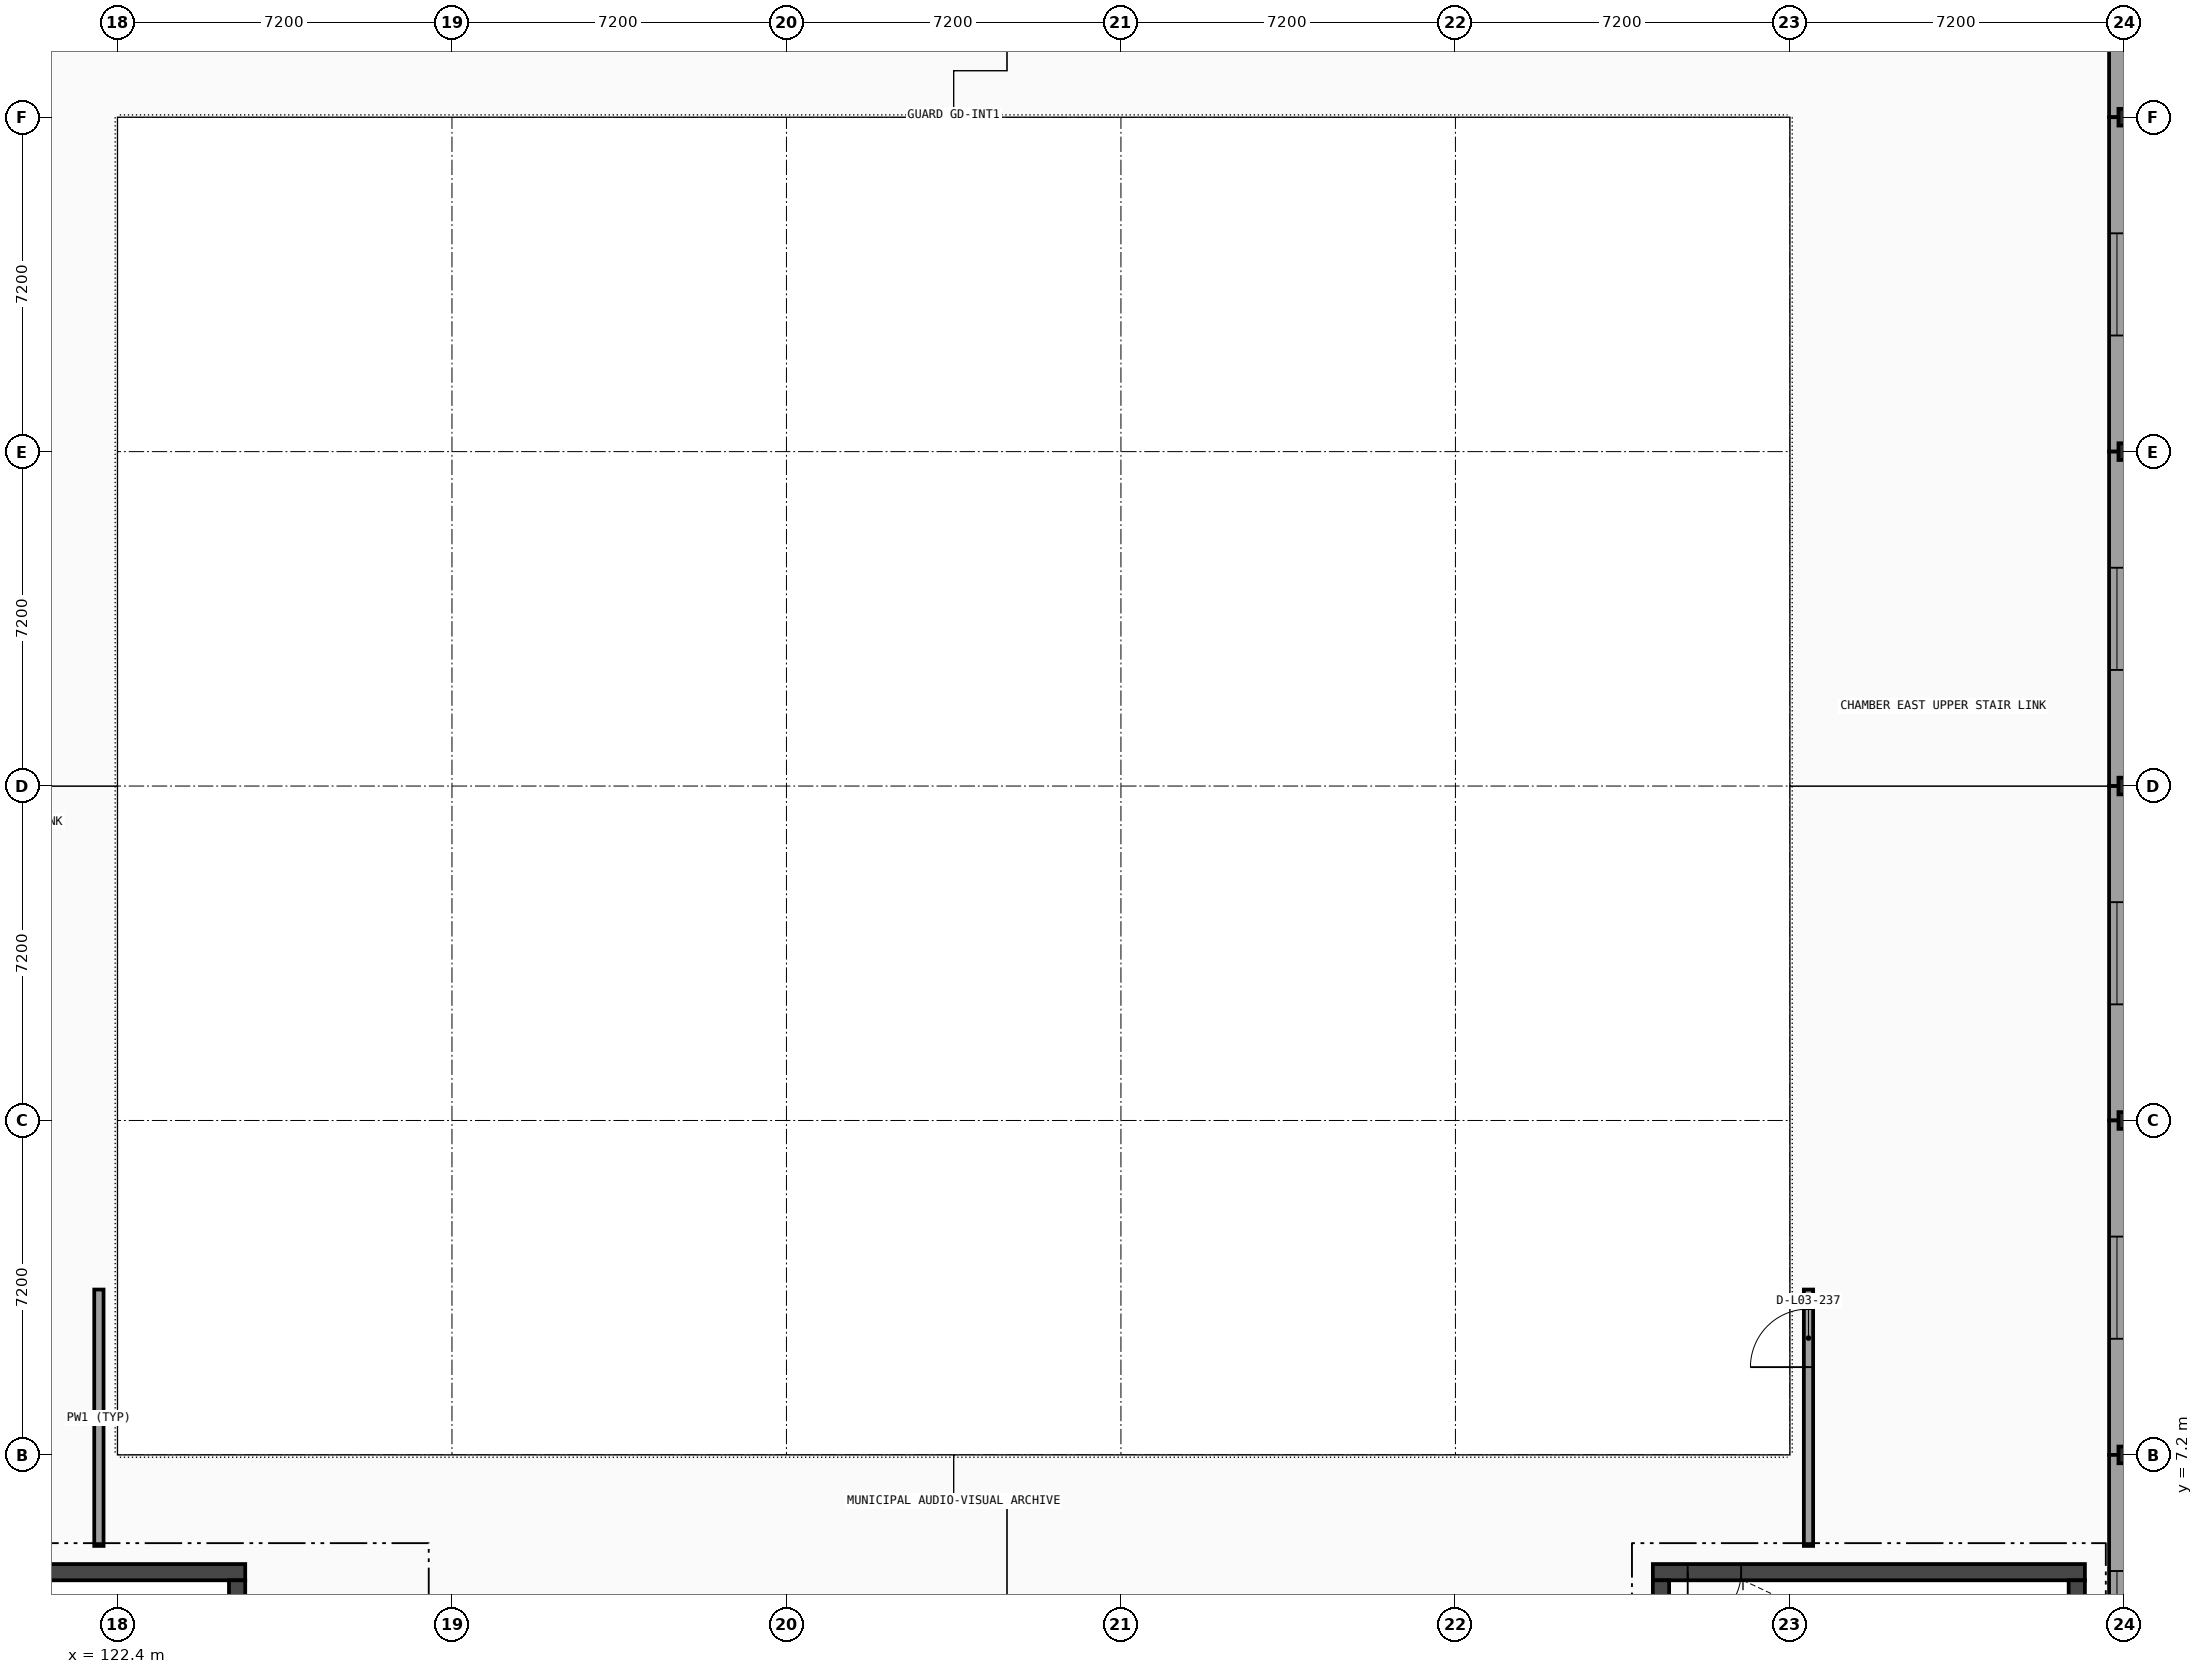
"""IFC4 building model, lengths in metres.
Left out: names, types, materials, properties, quantities, classifications, styles, units other than length and angle.
Written with IfcOpenShell. Run it as: python <this file> out.ifc"""

import sys

from ifc_helpers import new_model, si_unit, direction, frame, frame_2d, origin, origin_2d, place, context, subcontext, project, spatial, rectangle, i_section, extrude, element, fill, save


model = new_model("IFC4")
c1 = context("Model", 3, precision=1e-05, world=origin(), true_north=direction((0.0, 1.0)))
c2 = subcontext(c1, "Body", "Model", "MODEL_VIEW")
j1 = project(units=[si_unit("LENGTHUNIT", "METRE"), si_unit("PLANEANGLEUNIT", "RADIAN")], contexts=[c1])
p1 = place(None, origin())
s1 = spatial("IfcSite", under=j1, at=p1, CompositionType="ELEMENT")
p2 = place(p1, origin())
s2 = spatial("IfcBuilding", under=s1, at=p2, CompositionType="ELEMENT")
p3 = place(p2, frame((0.0, 0.0, 14.7)))
s3 = spatial("IfcBuildingStorey", under=s2, at=p3, CompositionType="ELEMENT", Elevation=14.7)
for number, where, z_axis, x_axis in (
    (1, (165.6, 7.2, 0.0), (0.0, 0.0, 1.0), (1.0, 0.0, 0.0)),
    (2, (165.6, 14.4, 0.0), (0.0, 0.0, 1.0), (1.0, 0.0, 0.0)),
    (3, (165.6, 21.6, 0.0), (0.0, 0.0, 1.0), (1.0, 0.0, 0.0)),
    (4, (165.6, 28.8, 0.0), (0.0, 0.0, 1.0), (1.0, 0.0, 0.0)),
    (5, (165.6, 36.0, 0.0), (0.0, 0.0, 1.0), (1.0, 0.0, 0.0)),
):
    element("IfcColumn", number, at=place(p3, frame(where, z_axis=z_axis, x_axis=x_axis)), inside=s3, PredefinedType="COLUMN", context=c2, shape_type="SweptSolid", body=[
        extrude(i_section(OverallWidth=0.256, OverallDepth=0.36, WebThickness=0.011, FlangeThickness=0.02, FilletRadius=0.015, at=origin_2d()), origin(), (0.0, 0.0, 1.0), 4.2),
    ])
p4 = place(p3, frame((165.44, 43.2, 0.0), z_axis=(0.0, 0.0, 1.0), x_axis=(0.0, -1.0, 0.0)))
e6 = element("IfcWall", 6, at=p4, inside=s3, PredefinedType="SOLIDWALL", context=c2, shape_type="SweptSolid", body=[
    extrude(rectangle(XDim=7.2, YDim=0.34, at=frame_2d((3.6, 0.0))), origin(), (0.0, 0.0, 1.0), 3.018),
])
p5 = place(p4, frame((2.5, 0.0, 1.4)))
e7 = element("IfcOpeningElement", 7, at=p5, cuts=e6, PredefinedType="OPENING", context=c2, shape_type="SweptSolid", body=[
    extrude(rectangle(XDim=2.2, YDim=1.05, at=frame_2d((1.1, 0.525))), frame((0.0, 0.18, 0.0), z_axis=(0.0, -1.0, 0.0), x_axis=(1.0, 0.0, 0.0)), (0.0, 0.0, 1.0), 0.36),
])
p6 = place(p3, frame((165.44, 36.0, 0.0), z_axis=(0.0, 0.0, 1.0), x_axis=(0.0, -1.0, 0.0)))
e8 = element("IfcWall", 8, at=p6, inside=s3, PredefinedType="SOLIDWALL", context=c2, shape_type="SweptSolid", body=[
    extrude(rectangle(XDim=7.2, YDim=0.34, at=frame_2d((3.6, 0.0))), origin(), (0.0, 0.0, 1.0), 3.235),
])
p7 = place(p6, frame((2.5, 0.0, 1.4)))
e9 = element("IfcOpeningElement", 9, at=p7, cuts=e8, PredefinedType="OPENING", context=c2, shape_type="SweptSolid", body=[
    extrude(rectangle(XDim=2.2, YDim=1.05, at=frame_2d((1.1, 0.525))), frame((0.0, 0.18, 0.0), z_axis=(0.0, -1.0, 0.0), x_axis=(1.0, 0.0, 0.0)), (0.0, 0.0, 1.0), 0.36),
])
p8 = place(p3, frame((165.44, 28.8, 0.0), z_axis=(0.0, 0.0, 1.0), x_axis=(0.0, -1.0, 0.0)))
e10 = element("IfcWall", 10, at=p8, inside=s3, PredefinedType="SOLIDWALL", context=c2, shape_type="SweptSolid", body=[
    extrude(rectangle(XDim=7.2, YDim=0.34, at=frame_2d((3.6, 0.0))), origin(), (0.0, 0.0, 1.0), 3.235),
])
p9 = place(p8, frame((2.5, 0.0, 1.4)))
e11 = element("IfcOpeningElement", 11, at=p9, cuts=e10, PredefinedType="OPENING", context=c2, shape_type="SweptSolid", body=[
    extrude(rectangle(XDim=2.2, YDim=1.05, at=frame_2d((1.1, 0.525))), frame((0.0, 0.18, 0.0), z_axis=(0.0, -1.0, 0.0), x_axis=(1.0, 0.0, 0.0)), (0.0, 0.0, 1.0), 0.36),
])
p10 = place(p3, frame((165.44, 21.6, 0.0), z_axis=(0.0, 0.0, 1.0), x_axis=(0.0, -1.0, 0.0)))
e12 = element("IfcWall", 12, at=p10, inside=s3, PredefinedType="SOLIDWALL", context=c2, shape_type="SweptSolid", body=[
    extrude(rectangle(XDim=7.2, YDim=0.34, at=frame_2d((3.6, 0.0))), origin(), (0.0, 0.0, 1.0), 3.235),
])
p11 = place(p10, frame((2.5, 0.0, 1.4)))
e13 = element("IfcOpeningElement", 13, at=p11, cuts=e12, PredefinedType="OPENING", context=c2, shape_type="SweptSolid", body=[
    extrude(rectangle(XDim=2.2, YDim=1.05, at=frame_2d((1.1, 0.525))), frame((0.0, 0.18, 0.0), z_axis=(0.0, -1.0, 0.0), x_axis=(1.0, 0.0, 0.0)), (0.0, 0.0, 1.0), 0.36),
])
p12 = place(p3, frame((165.44, 14.4, 0.0), z_axis=(0.0, 0.0, 1.0), x_axis=(0.0, -1.0, 0.0)))
e14 = element("IfcWall", 14, at=p12, inside=s3, PredefinedType="SOLIDWALL", context=c2, shape_type="SweptSolid", body=[
    extrude(rectangle(XDim=7.2, YDim=0.34, at=frame_2d((3.6, 0.0))), origin(), (0.0, 0.0, 1.0), 3.235),
])
p13 = place(p12, frame((2.5, 0.0, 1.4)))
e15 = element("IfcOpeningElement", 15, at=p13, cuts=e14, PredefinedType="OPENING", context=c2, shape_type="SweptSolid", body=[
    extrude(rectangle(XDim=2.2, YDim=1.05, at=frame_2d((1.1, 0.525))), frame((0.0, 0.18, 0.0), z_axis=(0.0, -1.0, 0.0), x_axis=(1.0, 0.0, 0.0)), (0.0, 0.0, 1.0), 0.36),
])
p14 = place(p3, frame((165.44, 7.2, 0.0), z_axis=(0.0, 0.0, 1.0), x_axis=(0.0, -1.0, 0.0)))
e16 = element("IfcWall", 16, at=p14, inside=s3, PredefinedType="SOLIDWALL", context=c2, shape_type="SweptSolid", body=[
    extrude(rectangle(XDim=7.2, YDim=0.34, at=frame_2d((3.6, 0.0))), origin(), (0.0, 0.0, 1.0), 3.018),
])
p15 = place(p14, frame((2.5, 0.0, 1.4)))
e17 = element("IfcOpeningElement", 17, at=p15, cuts=e16, PredefinedType="OPENING", context=c2, shape_type="SweptSolid", body=[
    extrude(rectangle(XDim=2.2, YDim=1.05, at=frame_2d((1.1, 0.525))), frame((0.0, 0.18, 0.0), z_axis=(0.0, -1.0, 0.0), x_axis=(1.0, 0.0, 0.0)), (0.0, 0.0, 1.0), 0.36),
])
p16 = place(p3, frame((125.15, 4.675, 0.0), z_axis=(0.0, 0.0, 1.0), x_axis=(-1.0, 0.0, 0.0)))
e18 = element("IfcWall", 18, at=p16, inside=s3, PredefinedType="SHEAR", context=c2, shape_type="SweptSolid", body=[
    extrude(rectangle(XDim=9.3, YDim=0.35, at=frame_2d((4.65, 0.0))), origin(), (0.0, 0.0, 1.0), 3.95),
])
p17 = place(p16, frame((7.4, 0.0, 0.0)))
e19 = element("IfcOpeningElement", 19, at=p17, cuts=e18, PredefinedType="OPENING", context=c2, shape_type="SweptSolid", body=[
    extrude(rectangle(XDim=1.15, YDim=2.1, at=frame_2d((0.575, 1.05))), frame((0.0, 0.185, 0.0), z_axis=(0.0, -1.0, 0.0), x_axis=(1.0, 0.0, 0.0)), (0.0, 0.0, 1.0), 0.37),
])
p18 = place(p3, frame((124.975, 1.2, 0.0), z_axis=(0.0, 0.0, 1.0), x_axis=(0.0, 1.0, 0.0)))
e20 = element("IfcWall", 20, at=p18, inside=s3, PredefinedType="SHEAR", context=c2, shape_type="SweptSolid", body=[
    extrude(rectangle(XDim=3.3, YDim=0.35, at=frame_2d((1.65, 0.0))), origin(), (0.0, 0.0, 1.0), 3.95),
])
p19 = place(p3, frame((164.75, 4.675, 0.0), z_axis=(0.0, 0.0, 1.0), x_axis=(-1.0, 0.0, 0.0)))
e21 = element("IfcWall", 21, at=p19, inside=s3, PredefinedType="SHEAR", context=c2, shape_type="SweptSolid", body=[
    extrude(rectangle(XDim=9.3, YDim=0.35, at=frame_2d((4.65, 0.0))), origin(), (0.0, 0.0, 1.0), 3.95),
])
p20 = place(p19, frame((7.4, 0.0, 0.0)))
e22 = element("IfcOpeningElement", 22, at=p20, cuts=e21, PredefinedType="OPENING", context=c2, shape_type="SweptSolid", body=[
    extrude(rectangle(XDim=1.15, YDim=2.1, at=frame_2d((0.575, 1.05))), frame((0.0, 0.185, 0.0), z_axis=(0.0, -1.0, 0.0), x_axis=(1.0, 0.0, 0.0)), (0.0, 0.0, 1.0), 0.37),
])
for number, where, z_axis, x_axis in (
    (23, (155.625, 4.5, 0.0), (0.0, 0.0, 1.0), (0.0, -1.0, 0.0)),
    (24, (164.575, 1.2, 0.0), (0.0, 0.0, 1.0), (0.0, 1.0, 0.0)),
):
    element("IfcWall", number, at=place(p3, frame(where, z_axis=z_axis, x_axis=x_axis)), inside=s3, PredefinedType="SHEAR", context=c2, shape_type="SweptSolid", body=[
        extrude(rectangle(XDim=3.3, YDim=0.35, at=frame_2d((1.65, 0.0))), origin(), (0.0, 0.0, 1.0), 3.95),
    ])
p21 = place(p3, frame((122.0, 5.24, 0.0), z_axis=(0.0, 0.0, 1.0), x_axis=(0.0, 1.0, 0.0)))
e25 = element("IfcWall", 25, at=p21, inside=s3, PredefinedType="PARTITIONING", context=c2, shape_type="SweptSolid", body=[
    extrude(rectangle(XDim=5.52, YDim=0.2, at=frame_2d((2.76, 0.0))), origin(), (0.0, 0.0, 1.0), 3.95),
])
p22 = place(p3, frame((158.8, 5.24, 0.0), z_axis=(0.0, 0.0, 1.0), x_axis=(0.0, 1.0, 0.0)))
e26 = element("IfcWall", 26, at=p22, inside=s3, PredefinedType="PARTITIONING", context=c2, shape_type="SweptSolid", body=[
    extrude(rectangle(XDim=5.52, YDim=0.2, at=frame_2d((2.76, 0.0))), origin(), (0.0, 0.0, 1.0), 3.95),
])
p23 = place(p22, frame((3.85, 0.0, 0.0)))
e27 = element("IfcOpeningElement", 27, at=p23, cuts=e26, PredefinedType="OPENING", context=c2, shape_type="SweptSolid", body=[
    extrude(rectangle(XDim=1.25, YDim=2.1, at=frame_2d((0.625, 1.05))), frame((0.0, 0.11, 0.0), z_axis=(0.0, -1.0, 0.0), x_axis=(1.0, 0.0, 0.0)), (0.0, 0.0, 1.0), 0.22),
])
p24 = place(p7, origin())
e28 = element("IfcWindow", 28, at=p24, inside=s3, PartitioningType="SINGLE_PANEL", PredefinedType="WINDOW", context=c2, shape_type="SweptSolid", body=[
    extrude(rectangle(XDim=2.2, YDim=1.05, at=frame_2d((1.1, 0.525))), frame((0.0, 0.03, 0.0), z_axis=(0.0, -1.0, 0.0), x_axis=(1.0, 0.0, 0.0)), (0.0, 0.0, 1.0), 0.06),
])
fill(e9, e28)
p25 = place(p9, origin())
e29 = element("IfcWindow", 29, at=p25, inside=s3, PartitioningType="SINGLE_PANEL", PredefinedType="WINDOW", context=c2, shape_type="SweptSolid", body=[
    extrude(rectangle(XDim=2.2, YDim=1.05, at=frame_2d((1.1, 0.525))), frame((0.0, 0.03, 0.0), z_axis=(0.0, -1.0, 0.0), x_axis=(1.0, 0.0, 0.0)), (0.0, 0.0, 1.0), 0.06),
])
fill(e11, e29)
p26 = place(p11, origin())
e30 = element("IfcWindow", 30, at=p26, inside=s3, PartitioningType="SINGLE_PANEL", PredefinedType="WINDOW", context=c2, shape_type="SweptSolid", body=[
    extrude(rectangle(XDim=2.2, YDim=1.05, at=frame_2d((1.1, 0.525))), frame((0.0, 0.03, 0.0), z_axis=(0.0, -1.0, 0.0), x_axis=(1.0, 0.0, 0.0)), (0.0, 0.0, 1.0), 0.06),
])
fill(e13, e30)
p27 = place(p13, origin())
e31 = element("IfcWindow", 31, at=p27, inside=s3, PartitioningType="SINGLE_PANEL", PredefinedType="WINDOW", context=c2, shape_type="SweptSolid", body=[
    extrude(rectangle(XDim=2.2, YDim=1.05, at=frame_2d((1.1, 0.525))), frame((0.0, 0.03, 0.0), z_axis=(0.0, -1.0, 0.0), x_axis=(1.0, 0.0, 0.0)), (0.0, 0.0, 1.0), 0.06),
])
fill(e15, e31)
p28 = place(p15, origin())
e32 = element("IfcWindow", 32, at=p28, inside=s3, PartitioningType="SINGLE_PANEL", PredefinedType="WINDOW", context=c2, shape_type="SweptSolid", body=[
    extrude(rectangle(XDim=2.2, YDim=1.05, at=frame_2d((1.1, 0.525))), frame((0.0, 0.03, 0.0), z_axis=(0.0, -1.0, 0.0), x_axis=(1.0, 0.0, 0.0)), (0.0, 0.0, 1.0), 0.06),
])
fill(e17, e32)
p29 = place(p20, frame((1.15, 0.0, 0.0), z_axis=(0.0, 0.0, 1.0), x_axis=(-1.0, 0.0, 0.0)))
e33 = element("IfcDoor", 33, at=p29, inside=s3, OperationType="SINGLE_SWING_LEFT", PredefinedType="DOOR", context=c2, shape_type="SweptSolid", body=[
    extrude(rectangle(XDim=1.15, YDim=2.1, at=frame_2d((0.575, 1.05))), frame((0.0, 0.025, 0.0), z_axis=(0.0, -1.0, 0.0), x_axis=(1.0, 0.0, 0.0)), (0.0, 0.0, 1.0), 0.05),
])
fill(e22, e33)
p30 = place(p23, origin())
e34 = element("IfcDoor", 34, at=p30, inside=s3, OperationType="SINGLE_SWING_LEFT", PredefinedType="DOOR", context=c2, shape_type="SweptSolid", body=[
    extrude(rectangle(XDim=1.25, YDim=2.1, at=frame_2d((0.625, 1.05))), frame((0.0, 0.025, 0.0), z_axis=(0.0, -1.0, 0.0), x_axis=(1.0, 0.0, 0.0)), (0.0, 0.0, 1.0), 0.05),
])
fill(e27, e34)
save(model, sys.argv[1])
